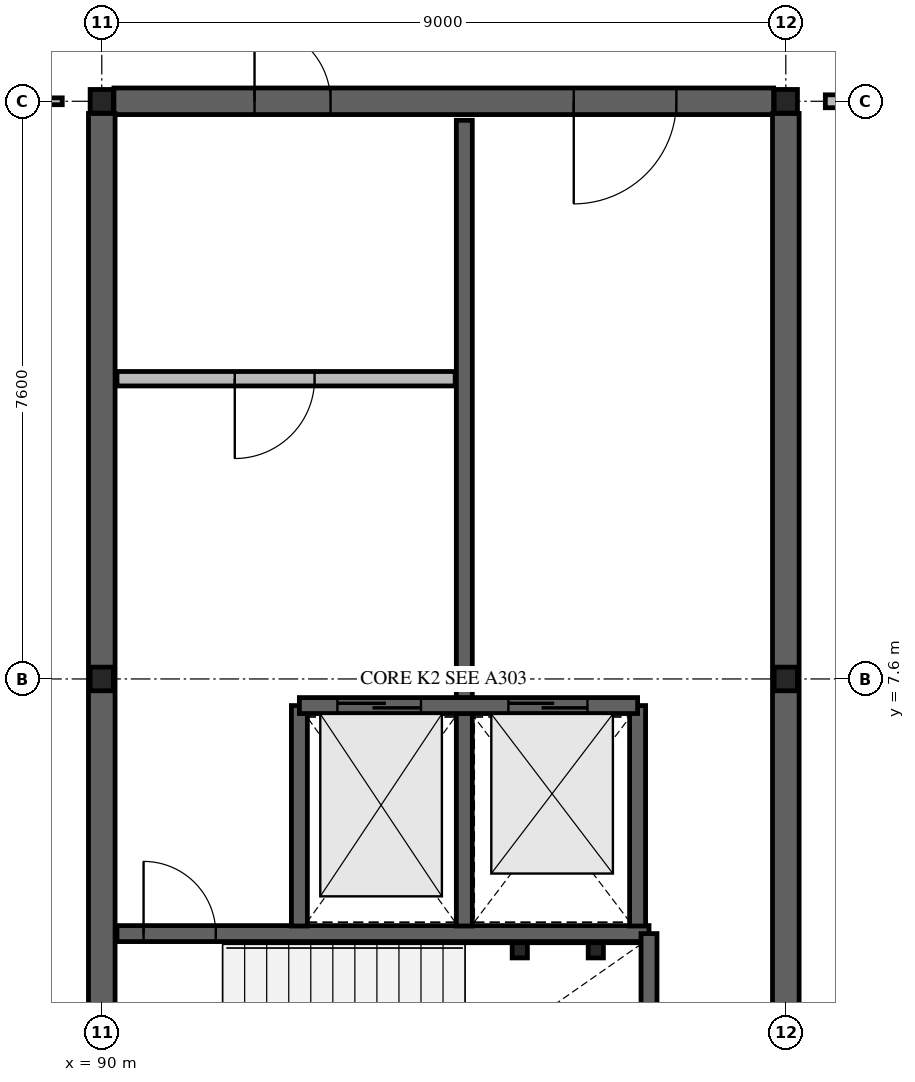
"""IFC4 building model, lengths in metres.
Left out: names, types, materials, properties, quantities, classifications, styles, units other than length and angle.
Written with IfcOpenShell. Run it as: python <this file> out.ifc"""

import sys

from ifc_helpers import new_model, si_unit, direction, frame, frame_2d, origin, origin_2d, place, context, subcontext, project, spatial, rectangle, hollow_rectangle, i_section, extrude, element, fill, save


model = new_model("IFC4")
c1 = context("Model", 3, precision=1e-05, world=origin(), true_north=direction((0.0, 1.0)))
c2 = subcontext(c1, "Body", "Model", "MODEL_VIEW")
j1 = project(units=[si_unit("LENGTHUNIT", "METRE"), si_unit("PLANEANGLEUNIT", "RADIAN")], contexts=[c1])
p1 = place(None, origin())
s1 = spatial("IfcSite", under=j1, at=p1, CompositionType="ELEMENT")
p2 = place(p1, origin())
s2 = spatial("IfcBuilding", under=s1, at=p2, CompositionType="ELEMENT")
p3 = place(p2, frame((0.0, 0.0, 18.0)))
s3 = spatial("IfcBuildingStorey", under=s2, at=p3, CompositionType="ELEMENT", Elevation=18.0)
for number, where, z_axis, x_axis in (
    (1, (90.0, 7.6, 0.0), (0.0, 0.0, 1.0), (1.0, 0.0, 0.0)),
    (2, (90.0, 15.2, 0.0), (0.0, 0.0, 1.0), (1.0, 0.0, 0.0)),
    (3, (99.0, 7.6, 0.0), (0.0, 0.0, 1.0), (1.0, 0.0, 0.0)),
    (4, (99.0, 15.2, 0.0), (0.0, 0.0, 1.0), (1.0, 0.0, 0.0)),
):
    element("IfcColumn", number, at=place(p3, frame(where, z_axis=z_axis, x_axis=x_axis)), inside=s3, PredefinedType="COLUMN", context=c2, shape_type="SweptSolid", body=[
        extrude(i_section(OverallWidth=0.306, OverallDepth=0.311, WebThickness=0.011, FlangeThickness=0.017, FilletRadius=0.015, at=origin_2d()), origin(), (0.0, 0.0, 1.0), 4.32),
    ])
p4 = place(p3, frame((90.16, 15.2, 0.0), z_axis=(0.0, 0.0, 1.0), x_axis=(1.0, 0.0, 0.0)))
e5 = element("IfcWall", 5, at=p4, inside=s3, PredefinedType="SHEAR", context=c2, shape_type="SweptSolid", body=[
    extrude(rectangle(XDim=8.68, YDim=0.35, at=frame_2d((4.34, 0.0))), origin(), (0.0, 0.0, 1.0), 4.04),
])
p5 = place(p4, frame((1.85, 0.0, 0.0)))
e6 = element("IfcOpeningElement", 6, at=p5, cuts=e5, PredefinedType="OPENING", context=c2, shape_type="SweptSolid", body=[
    extrude(rectangle(XDim=1.0, YDim=2.15, at=frame_2d((0.5, 1.075))), frame((0.0, 0.185, 0.0), z_axis=(0.0, -1.0, 0.0), x_axis=(1.0, 0.0, 0.0)), (0.0, 0.0, 1.0), 0.37),
])
p6 = place(p4, frame((6.05, 0.0, 0.0)))
e7 = element("IfcOpeningElement", 7, at=p6, cuts=e5, PredefinedType="OPENING", context=c2, shape_type="SweptSolid", body=[
    extrude(rectangle(XDim=1.35, YDim=2.18, at=frame_2d((0.675, 1.09))), frame((0.0, 0.185, 0.0), z_axis=(0.0, -1.0, 0.0), x_axis=(1.0, 0.0, 0.0)), (0.0, 0.0, 1.0), 0.37),
])
for number, where, z_axis, x_axis in (
    (8, (90.0, 0.16, 0.0), (0.0, 0.0, 1.0), (0.0, 1.0, 0.0)),
    (9, (99.0, 0.16, 0.0), (0.0, 0.0, 1.0), (0.0, 1.0, 0.0)),
):
    element("IfcWall", number, at=place(p3, frame(where, z_axis=z_axis, x_axis=x_axis)), inside=s3, PredefinedType="SHEAR", context=c2, shape_type="SweptSolid", body=[
        extrude(rectangle(XDim=14.88, YDim=0.35, at=frame_2d((7.44, 0.0))), origin(), (0.0, 0.0, 1.0), 4.04),
    ])
p7 = place(p3, frame((90.2, 4.25, 0.0), z_axis=(0.0, 0.0, 1.0), x_axis=(1.0, 0.0, 0.0)))
e10 = element("IfcWall", 10, at=p7, inside=s3, PredefinedType="SOLIDWALL", context=c2, shape_type="SweptSolid", body=[
    extrude(rectangle(XDim=7.0, YDim=0.21, at=frame_2d((3.5, 0.0))), origin(), (0.0, 0.0, 1.0), 4.04),
])
p8 = place(p7, frame((0.35, 0.0, 0.0)))
e11 = element("IfcOpeningElement", 11, at=p8, cuts=e10, PredefinedType="OPENING", context=c2, shape_type="SweptSolid", body=[
    extrude(rectangle(XDim=0.95, YDim=2.12, at=frame_2d((0.475, 1.06))), frame((0.0, 0.115, 0.0), z_axis=(0.0, -1.0, 0.0), x_axis=(1.0, 0.0, 0.0)), (0.0, 0.0, 1.0), 0.23),
])
p9 = place(p3, frame((97.2, 0.2, 0.0), z_axis=(0.0, 0.0, 1.0), x_axis=(0.0, 1.0, 0.0)))
e12 = element("IfcWall", 12, at=p9, inside=s3, PredefinedType="SOLIDWALL", context=c2, shape_type="SweptSolid", body=[
    extrude(rectangle(XDim=4.05, YDim=0.21, at=frame_2d((2.025, 0.0))), origin(), (0.0, 0.0, 1.0), 4.04),
])
p10 = place(p3, frame((92.6, 4.35, 0.0), z_axis=(0.0, 0.0, 1.0), x_axis=(0.0, 1.0, 0.0)))
e13 = element("IfcWall", 13, at=p10, inside=s3, PredefinedType="SOLIDWALL", context=c2, shape_type="SweptSolid", body=[
    extrude(rectangle(XDim=2.9, YDim=0.21, at=frame_2d((1.45, 0.0))), origin(), (0.0, 0.0, 1.0), 4.04),
])
p11 = place(p3, frame((94.77, 4.35, 0.0), z_axis=(0.0, 0.0, 1.0), x_axis=(0.0, 1.0, 0.0)))
e14 = element("IfcWall", 14, at=p11, inside=s3, PredefinedType="SOLIDWALL", context=c2, shape_type="SweptSolid", body=[
    extrude(rectangle(XDim=10.6, YDim=0.21, at=frame_2d((5.3, 0.0))), origin(), (0.0, 0.0, 1.0), 4.04),
])
p12 = place(p3, frame((97.05, 4.35, 0.0), z_axis=(0.0, 0.0, 1.0), x_axis=(0.0, 1.0, 0.0)))
e15 = element("IfcWall", 15, at=p12, inside=s3, PredefinedType="SOLIDWALL", context=c2, shape_type="SweptSolid", body=[
    extrude(rectangle(XDim=2.9, YDim=0.21, at=frame_2d((1.45, 0.0))), origin(), (0.0, 0.0, 1.0), 4.04),
])
p13 = place(p3, frame((92.6, 7.25, 0.0), z_axis=(0.0, 0.0, 1.0), x_axis=(1.0, 0.0, 0.0)))
e16 = element("IfcWall", 16, at=p13, inside=s3, PredefinedType="SOLIDWALL", context=c2, shape_type="SweptSolid", body=[
    extrude(rectangle(XDim=4.45, YDim=0.21, at=frame_2d((2.225, 0.0))), origin(), (0.0, 0.0, 1.0), 4.04),
])
p14 = place(p13, frame((0.5, 0.0, 0.0)))
e17 = element("IfcOpeningElement", 17, at=p14, cuts=e16, PredefinedType="OPENING", context=c2, shape_type="SweptSolid", body=[
    extrude(rectangle(XDim=1.1, YDim=2.14, at=frame_2d((0.55, 1.07))), frame((0.0, 0.115, 0.0), z_axis=(0.0, -1.0, 0.0), x_axis=(1.0, 0.0, 0.0)), (0.0, 0.0, 1.0), 0.23),
])
p15 = place(p13, frame((2.75, 0.0, 0.0)))
e18 = element("IfcOpeningElement", 18, at=p15, cuts=e16, PredefinedType="OPENING", context=c2, shape_type="SweptSolid", body=[
    extrude(rectangle(XDim=1.04, YDim=2.1, at=frame_2d((0.52, 1.05))), frame((0.0, 0.115, 0.0), z_axis=(0.0, -1.0, 0.0), x_axis=(1.0, 0.0, 0.0)), (0.0, 0.0, 1.0), 0.23),
])
p16 = place(p3, frame((90.2, 11.55, 0.0), z_axis=(0.0, 0.0, 1.0), x_axis=(1.0, 0.0, 0.0)))
e19 = element("IfcWall", 19, at=p16, inside=s3, PredefinedType="SOLIDWALL", context=c2, shape_type="SweptSolid", body=[
    extrude(rectangle(XDim=4.45, YDim=0.19, at=frame_2d((2.225, 0.0))), origin(), (0.0, 0.0, 1.0), 4.04),
])
p17 = place(p16, frame((1.55, 0.0, 0.0)))
e20 = element("IfcOpeningElement", 20, at=p17, cuts=e19, PredefinedType="OPENING", context=c2, shape_type="SweptSolid", body=[
    extrude(rectangle(XDim=1.05, YDim=2.12, at=frame_2d((0.525, 1.06))), frame((0.0, 0.105, 0.0), z_axis=(0.0, -1.0, 0.0), x_axis=(1.0, 0.0, 0.0)), (0.0, 0.0, 1.0), 0.21),
])
for number, where, z_axis, x_axis in (
    (21, (95.5, 4.03, 0.0), (0.0, 0.0, 1.0), (1.0, 0.0, 0.0)),
    (22, (96.5, 4.03, 0.0), (0.0, 0.0, 1.0), (1.0, 0.0, 0.0)),
):
    element("IfcColumn", number, at=place(p3, frame(where, z_axis=z_axis, x_axis=x_axis)), inside=s3, PredefinedType="COLUMN", context=c2, shape_type="SweptSolid", body=[
        extrude(hollow_rectangle(XDim=0.2, YDim=0.2, WallThickness=0.012, at=origin_2d()), origin(), (0.0, 0.0, 1.0), 1.97),
    ])
p18 = place(p3, frame((72.52, 15.2, 0.0), z_axis=(0.0, 0.0, 1.0), x_axis=(1.0, 0.0, 0.0)))
e23 = element("IfcWall", 23, at=p18, inside=s3, PredefinedType="PARTITIONING", context=c2, shape_type="SweptSolid", body=[
    extrude(rectangle(XDim=16.96, YDim=0.09, at=frame_2d((8.48, 0.0))), origin(), (0.0, 0.0, 1.0), 3.524),
])
p19 = place(p18, frame((6.36, 0.0, 0.0)))
e24 = element("IfcOpeningElement", 24, at=p19, cuts=e23, PredefinedType="OPENING", context=c2, shape_type="SweptSolid", body=[
    extrude(rectangle(XDim=1.04, YDim=2.06, at=frame_2d((0.52, 1.03))), frame((0.0, 0.055, 0.0), z_axis=(0.0, -1.0, 0.0), x_axis=(1.0, 0.0, 0.0)), (0.0, 0.0, 1.0), 0.11),
])
p20 = place(p3, frame((99.52, 15.2, 0.0), z_axis=(0.0, 0.0, 1.0), x_axis=(1.0, 0.0, 0.0)))
e25 = element("IfcWall", 25, at=p20, inside=s3, PredefinedType="PARTITIONING", context=c2, shape_type="SweptSolid", body=[
    extrude(rectangle(XDim=7.96, YDim=0.17, at=frame_2d((3.98, 0.0))), origin(), (0.0, 0.0, 1.0), 3.554),
])
p21 = place(p20, frame((3.355, 0.0, 0.0)))
e26 = element("IfcOpeningElement", 26, at=p21, cuts=e25, PredefinedType="OPENING", context=c2, shape_type="SweptSolid", body=[
    extrude(rectangle(XDim=1.25, YDim=2.18, at=frame_2d((0.625, 1.09))), frame((0.0, 0.095, 0.0), z_axis=(0.0, -1.0, 0.0), x_axis=(1.0, 0.0, 0.0)), (0.0, 0.0, 1.0), 0.19),
])
p22 = place(p8, origin())
e27 = element("IfcDoor", 27, at=p22, inside=s3, OperationType="SINGLE_SWING_LEFT", PredefinedType="DOOR", context=c2, shape_type="SweptSolid", body=[
    extrude(rectangle(XDim=0.95, YDim=2.12, at=frame_2d((0.475, 1.06))), frame((0.0, 0.025, 0.0), z_axis=(0.0, -1.0, 0.0), x_axis=(1.0, 0.0, 0.0)), (0.0, 0.0, 1.0), 0.05),
])
fill(e11, e27)
p23 = place(p14, origin())
e28 = element("IfcDoor", 28, at=p23, inside=s3, OperationType="SLIDING_TO_LEFT", PredefinedType="DOOR", context=c2, shape_type="SweptSolid", body=[
    extrude(rectangle(XDim=1.1, YDim=2.14, at=frame_2d((0.55, 1.07))), frame((0.0, 0.025, 0.0), z_axis=(0.0, -1.0, 0.0), x_axis=(1.0, 0.0, 0.0)), (0.0, 0.0, 1.0), 0.05),
])
fill(e17, e28)
p24 = place(p15, origin())
e29 = element("IfcDoor", 29, at=p24, inside=s3, OperationType="SLIDING_TO_LEFT", PredefinedType="DOOR", context=c2, shape_type="SweptSolid", body=[
    extrude(rectangle(XDim=1.04, YDim=2.1, at=frame_2d((0.52, 1.05))), frame((0.0, 0.025, 0.0), z_axis=(0.0, -1.0, 0.0), x_axis=(1.0, 0.0, 0.0)), (0.0, 0.0, 1.0), 0.05),
])
fill(e18, e29)
p25 = place(p17, origin())
e30 = element("IfcDoor", 30, at=p25, inside=s3, OperationType="SINGLE_SWING_RIGHT", PredefinedType="DOOR", context=c2, shape_type="SweptSolid", body=[
    extrude(rectangle(XDim=1.05, YDim=2.12, at=frame_2d((0.525, 1.06))), frame((0.0, 0.025, 0.0), z_axis=(0.0, -1.0, 0.0), x_axis=(1.0, 0.0, 0.0)), (0.0, 0.0, 1.0), 0.05),
])
fill(e20, e30)
p26 = place(p5, origin())
e31 = element("IfcDoor", 31, at=p26, inside=s3, OperationType="SINGLE_SWING_LEFT", PredefinedType="DOOR", context=c2, shape_type="SweptSolid", body=[
    extrude(rectangle(XDim=1.0, YDim=2.15, at=frame_2d((0.5, 1.075))), frame((0.0, 0.025, 0.0), z_axis=(0.0, -1.0, 0.0), x_axis=(1.0, 0.0, 0.0)), (0.0, 0.0, 1.0), 0.05),
])
fill(e6, e31)
p27 = place(p6, origin())
e32 = element("IfcDoor", 32, at=p27, inside=s3, OperationType="SINGLE_SWING_RIGHT", PredefinedType="DOOR", context=c2, shape_type="SweptSolid", body=[
    extrude(rectangle(XDim=1.35, YDim=2.18, at=frame_2d((0.675, 1.09))), frame((0.0, 0.025, 0.0), z_axis=(0.0, -1.0, 0.0), x_axis=(1.0, 0.0, 0.0)), (0.0, 0.0, 1.0), 0.05),
])
fill(e7, e32)
save(model, sys.argv[1])
